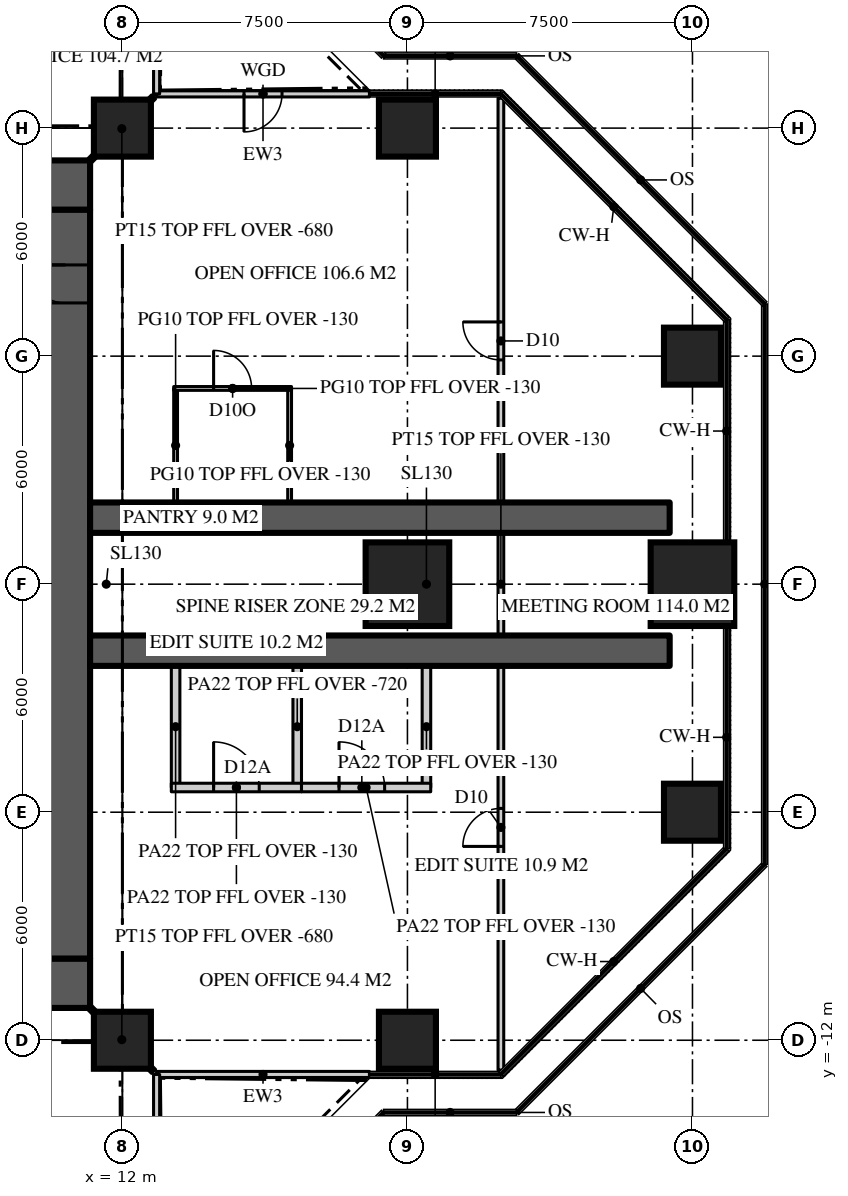
"""IFC4 building model, lengths in metres.
Left out: names, types, materials, properties, quantities, classifications, styles, units other than length and angle.
Written with IfcOpenShell. Run it as: python <this file> out.ifc"""

import sys

from ifc_helpers import new_model, si_unit, direction, frame, frame_2d, origin, origin_2d, place, context, subcontext, project, spatial, rectangle, extrude, element, fill, save


model = new_model("IFC4")
c1 = context("Model", 3, precision=1e-05, world=origin(), true_north=direction((0.0, 1.0)))
c2 = subcontext(c1, "Body", "Model", "MODEL_VIEW")
j1 = project(units=[si_unit("LENGTHUNIT", "METRE"), si_unit("PLANEANGLEUNIT", "RADIAN")], contexts=[c1])
p1 = place(None, origin())
s1 = spatial("IfcSite", under=j1, at=p1, CompositionType="ELEMENT")
p2 = place(p1, origin())
s2 = spatial("IfcBuilding", under=s1, at=p2, CompositionType="ELEMENT")
p3 = place(p2, frame((0.0, 0.0, 232.2)))
s3 = spatial("IfcBuildingStorey", under=s2, at=p3, CompositionType="ELEMENT", Elevation=232.2)
p4 = place(p3, frame((-11.15, 10.5, 0.0), z_axis=(0.0, 0.0, 1.0), x_axis=(1.0, 0.0, 0.0)))
e1 = element("IfcWall", 1, at=p4, inside=s3, PredefinedType="SHEAR", context=c2, shape_type="SweptSolid", body=[
    extrude(rectangle(XDim=22.3, YDim=1.3, at=frame_2d((11.15, 0.0))), origin(), (0.0, 0.0, 1.0), 3.9),
])
p5 = place(p4, frame((4.25, 0.0, 0.0)))
e2 = element("IfcOpeningElement", 2, at=p5, cuts=e1, PredefinedType="OPENING", context=c2, shape_type="SweptSolid", body=[
    extrude(rectangle(XDim=1.8, YDim=2.2, at=frame_2d((0.9, 1.1))), frame((0.0, 0.66, 0.0), z_axis=(0.0, -1.0, 0.0), x_axis=(1.0, 0.0, 0.0)), (0.0, 0.0, 1.0), 1.32),
])
p6 = place(p4, frame((16.25, 0.0, 0.0)))
e3 = element("IfcOpeningElement", 3, at=p6, cuts=e1, PredefinedType="OPENING", context=c2, shape_type="SweptSolid", body=[
    extrude(rectangle(XDim=1.8, YDim=2.2, at=frame_2d((0.9, 1.1))), frame((0.0, 0.66, 0.0), z_axis=(0.0, -1.0, 0.0), x_axis=(1.0, 0.0, 0.0)), (0.0, 0.0, 1.0), 1.32),
])
p7 = place(p3, frame((11.15, -10.5, 0.0), z_axis=(0.0, 0.0, 1.0), x_axis=(-1.0, 0.0, 0.0)))
e4 = element("IfcWall", 4, at=p7, inside=s3, PredefinedType="SHEAR", context=c2, shape_type="SweptSolid", body=[
    extrude(rectangle(XDim=22.3, YDim=1.3, at=frame_2d((11.15, 0.0))), origin(), (0.0, 0.0, 1.0), 3.9),
])
p8 = place(p7, frame((16.25, 0.0, 0.0)))
e5 = element("IfcOpeningElement", 5, at=p8, cuts=e4, PredefinedType="OPENING", context=c2, shape_type="SweptSolid", body=[
    extrude(rectangle(XDim=1.8, YDim=2.2, at=frame_2d((0.9, 1.1))), frame((0.0, 0.66, 0.0), z_axis=(0.0, -1.0, 0.0), x_axis=(1.0, 0.0, 0.0)), (0.0, 0.0, 1.0), 1.32),
])
p9 = place(p7, frame((4.25, 0.0, 0.0)))
e6 = element("IfcOpeningElement", 6, at=p9, cuts=e4, PredefinedType="OPENING", context=c2, shape_type="SweptSolid", body=[
    extrude(rectangle(XDim=1.8, YDim=2.2, at=frame_2d((0.9, 1.1))), frame((0.0, 0.66, 0.0), z_axis=(0.0, -1.0, 0.0), x_axis=(1.0, 0.0, 0.0)), (0.0, 0.0, 1.0), 1.32),
])
p10 = place(p3, frame((10.5, -9.85, 0.0), z_axis=(0.0, 0.0, 1.0), x_axis=(0.0, 1.0, 0.0)))
e7 = element("IfcWall", 7, at=p10, inside=s3, PredefinedType="SHEAR", context=c2, shape_type="SweptSolid", body=[
    extrude(rectangle(XDim=19.7, YDim=1.3, at=frame_2d((9.85, 0.0))), origin(), (0.0, 0.0, 1.0), 3.9),
])
p11 = place(p10, frame((17.25, 0.0, 0.0)))
e8 = element("IfcOpeningElement", 8, at=p11, cuts=e7, PredefinedType="OPENING", context=c2, shape_type="SweptSolid", body=[
    extrude(rectangle(XDim=1.0, YDim=2.2, at=frame_2d((0.5, 1.1))), frame((0.0, 0.66, 0.0), z_axis=(0.0, -1.0, 0.0), x_axis=(1.0, 0.0, 0.0)), (0.0, 0.0, 1.0), 1.32),
])
for number, where, z_axis, x_axis in (
    (9, (11.15, -1.75, 0.0), (0.0, 0.0, 1.0), (1.0, 0.0, 0.0)),
    (10, (11.15, 1.75, 0.0), (0.0, 0.0, 1.0), (1.0, 0.0, 0.0)),
):
    element("IfcWall", number, at=place(p3, frame(where, z_axis=z_axis, x_axis=x_axis)), inside=s3, PredefinedType="SHEAR", context=c2, shape_type="SweptSolid", body=[
        extrude(rectangle(XDim=15.25, YDim=0.8, at=frame_2d((7.625, 0.0))), origin(), (0.0, 0.0, 1.0), 3.9),
    ])
for number, where, z_axis, x_axis in (
    (11, (12.0, -12.0, 0.0), (0.0, 0.0, 1.0), (1.0, 0.0, 0.0)),
    (12, (19.5, -12.0, 0.0), (0.0, 0.0, 1.0), (1.0, 0.0, 0.0)),
    (13, (27.0, -6.0, 0.0), (0.0, 0.0, 1.0), (1.0, 0.0, 0.0)),
):
    element("IfcColumn", number, at=place(p3, frame(where, z_axis=z_axis, x_axis=x_axis)), inside=s3, PredefinedType="COLUMN", context=c2, shape_type="SweptSolid", body=[
        extrude(rectangle(XDim=1.5, YDim=1.5, at=origin_2d()), origin(), (0.0, 0.0, 1.0), 3.9),
    ])
for number, where, z_axis, x_axis in (
    (14, (19.5, 0.0, 0.0), (0.0, 0.0, 1.0), (1.0, 0.0, 0.0)),
    (15, (27.0, 0.0, 0.0), (0.0, 0.0, 1.0), (1.0, 0.0, 0.0)),
):
    element("IfcColumn", number, at=place(p3, frame(where, z_axis=z_axis, x_axis=x_axis)), inside=s3, PredefinedType="COLUMN", context=c2, shape_type="SweptSolid", body=[
        extrude(rectangle(XDim=2.2, YDim=2.2, at=origin_2d()), origin(), (0.0, 0.0, 1.0), 3.9),
    ])
for number, where, z_axis, x_axis in (
    (16, (27.0, 6.0, 0.0), (0.0, 0.0, 1.0), (1.0, 0.0, 0.0)),
    (17, (12.0, 12.0, 0.0), (0.0, 0.0, 1.0), (1.0, 0.0, 0.0)),
    (18, (19.5, 12.0, 0.0), (0.0, 0.0, 1.0), (1.0, 0.0, 0.0)),
):
    element("IfcColumn", number, at=place(p3, frame(where, z_axis=z_axis, x_axis=x_axis)), inside=s3, PredefinedType="COLUMN", context=c2, shape_type="SweptSolid", body=[
        extrude(rectangle(XDim=1.5, YDim=1.5, at=origin_2d()), origin(), (0.0, 0.0, 1.0), 3.9),
    ])
p12 = place(p3, frame((12.9, -12.9, 0.0), z_axis=(0.0, 0.0, 1.0), x_axis=(1.0, 0.0, 0.0)))
e19 = element("IfcWall", 19, at=p12, inside=s3, PredefinedType="SOLIDWALL", context=c2, shape_type="SweptSolid", body=[
    extrude(rectangle(XDim=5.6, YDim=0.16, at=frame_2d((2.8, 0.0))), origin(), (0.0, 0.0, 1.0), 3.77),
])
p13 = place(p3, frame((18.5, 12.9, 0.0), z_axis=(0.0, 0.0, 1.0), x_axis=(-1.0, 0.0, 0.0)))
e20 = element("IfcWall", 20, at=p13, inside=s3, PredefinedType="SOLIDWALL", context=c2, shape_type="SweptSolid", body=[
    extrude(rectangle(XDim=5.6, YDim=0.16, at=frame_2d((2.8, 0.0))), origin(), (0.0, 0.0, 1.0), 3.77),
])
p14 = place(p13, frame((2.3, 0.0, 0.0)))
e21 = element("IfcOpeningElement", 21, at=p14, cuts=e20, PredefinedType="OPENING", context=c2, shape_type="SweptSolid", body=[
    extrude(rectangle(XDim=1.0, YDim=2.2, at=frame_2d((0.5, 1.1))), frame((0.0, 0.09, 0.0), z_axis=(0.0, -1.0, 0.0), x_axis=(1.0, 0.0, 0.0)), (0.0, 0.0, 1.0), 0.18),
])
p15 = place(p3, frame((12.9, 12.9, 0.0), z_axis=(0.0, 0.0, 1.0), x_axis=(0.0, 1.0, 0.0)))
e22 = element("IfcWall", 22, at=p15, inside=s3, PredefinedType="SOLIDWALL", context=c2, shape_type="SweptSolid", body=[
    extrude(rectangle(XDim=5.6, YDim=0.16, at=frame_2d((2.8, 0.0))), origin(), (0.0, 0.0, 1.0), 3.77),
])
p16 = place(p3, frame((12.9, -18.5, 0.0), z_axis=(0.0, 0.0, 1.0), x_axis=(0.0, 1.0, 0.0)))
e23 = element("IfcWall", 23, at=p16, inside=s3, PredefinedType="SOLIDWALL", context=c2, shape_type="SweptSolid", body=[
    extrude(rectangle(XDim=5.6, YDim=0.16, at=frame_2d((2.8, 0.0))), origin(), (0.0, 0.0, 1.0), 3.77),
])
p17 = place(p16, frame((2.3, 0.0, 0.0)))
e24 = element("IfcOpeningElement", 24, at=p17, cuts=e23, PredefinedType="OPENING", context=c2, shape_type="SweptSolid", body=[
    extrude(rectangle(XDim=1.0, YDim=2.2, at=frame_2d((0.5, 1.1))), frame((0.0, 0.09, 0.0), z_axis=(0.0, -1.0, 0.0), x_axis=(1.0, 0.0, 0.0)), (0.0, 0.0, 1.0), 0.18),
])
p18 = place(p3, frame((21.959, -12.786, 0.0), z_axis=(0.0, 0.0, 1.0), x_axis=(0.0, 1.0, 0.0)))
e25 = element("IfcWall", 25, at=p18, inside=s3, PredefinedType="PARTITIONING", context=c2, shape_type="SweptSolid", body=[
    extrude(rectangle(XDim=25.573, YDim=0.15, at=frame_2d((12.786, 0.0))), origin(), (0.0, 0.0, 1.0), 3.77),
])
p19 = place(p18, frame((18.687, 0.0, 0.0)))
e26 = element("IfcOpeningElement", 26, at=p19, cuts=e25, PredefinedType="OPENING", context=c2, shape_type="SweptSolid", body=[
    extrude(rectangle(XDim=1.0, YDim=2.2, at=frame_2d((0.5, 1.1))), frame((0.0, 0.085, 0.0), z_axis=(0.0, -1.0, 0.0), x_axis=(1.0, 0.0, 0.0)), (0.0, 0.0, 1.0), 0.17),
])
p20 = place(p18, frame((5.886, 0.0, 0.0)))
e27 = element("IfcOpeningElement", 27, at=p20, cuts=e25, PredefinedType="OPENING", context=c2, shape_type="SweptSolid", body=[
    extrude(rectangle(XDim=1.0, YDim=2.2, at=frame_2d((0.5, 1.1))), frame((0.0, 0.085, 0.0), z_axis=(0.0, -1.0, 0.0), x_axis=(1.0, 0.0, 0.0)), (0.0, 0.0, 1.0), 0.17),
])
for number, where, z_axis, x_axis in (
    (28, (13.4, 2.15, 0.0), (0.0, 0.0, 1.0), (0.0, 1.0, 0.0)),
    (29, (16.4, 2.15, 0.0), (0.0, 0.0, 1.0), (0.0, 1.0, 0.0)),
):
    element("IfcWall", number, at=place(p3, frame(where, z_axis=z_axis, x_axis=x_axis)), inside=s3, PredefinedType="PARTITIONING", context=c2, shape_type="SweptSolid", body=[
        extrude(rectangle(XDim=3.0, YDim=0.1, at=frame_2d((1.5, 0.0))), origin(), (0.0, 0.0, 1.0), 3.77),
    ])
p21 = place(p3, frame((13.35, 5.15, 0.0), z_axis=(0.0, 0.0, 1.0), x_axis=(1.0, 0.0, 0.0)))
e30 = element("IfcWall", 30, at=p21, inside=s3, PredefinedType="PARTITIONING", context=c2, shape_type="SweptSolid", body=[
    extrude(rectangle(XDim=3.1, YDim=0.1, at=frame_2d((1.55, 0.0))), origin(), (0.0, 0.0, 1.0), 3.77),
])
p22 = place(p21, frame((1.05, 0.0, 0.0)))
e31 = element("IfcOpeningElement", 31, at=p22, cuts=e30, PredefinedType="OPENING", context=c2, shape_type="SweptSolid", body=[
    extrude(rectangle(XDim=1.0, YDim=2.2, at=frame_2d((0.5, 1.1))), frame((0.0, 0.06, 0.0), z_axis=(0.0, -1.0, 0.0), x_axis=(1.0, 0.0, 0.0)), (0.0, 0.0, 1.0), 0.12),
])
p23 = place(p3, frame((13.4, -2.15, 0.0), z_axis=(0.0, 0.0, 1.0), x_axis=(0.0, -1.0, 0.0)))
e32 = element("IfcWall", 32, at=p23, inside=s3, PredefinedType="PARTITIONING", context=c2, shape_type="SweptSolid", body=[
    extrude(rectangle(XDim=3.2, YDim=0.225, at=frame_2d((1.6, 0.0))), origin(), (0.0, 0.0, 1.0), 3.77),
])
p24 = place(p3, frame((16.6, -2.15, 0.0), z_axis=(0.0, 0.0, 1.0), x_axis=(0.0, -1.0, 0.0)))
e33 = element("IfcWall", 33, at=p24, inside=s3, PredefinedType="PARTITIONING", context=c2, shape_type="SweptSolid", body=[
    extrude(rectangle(XDim=3.2, YDim=0.225, at=frame_2d((1.6, 0.0))), origin(), (0.0, 0.0, 1.0), 3.18),
])
p25 = place(p3, frame((13.288, -5.35, 0.0), z_axis=(0.0, 0.0, 1.0), x_axis=(1.0, 0.0, 0.0)))
e34 = element("IfcWall", 34, at=p25, inside=s3, PredefinedType="PARTITIONING", context=c2, shape_type="SweptSolid", body=[
    extrude(rectangle(XDim=3.425, YDim=0.225, at=frame_2d((1.712, 0.0))), origin(), (0.0, 0.0, 1.0), 3.77),
])
p26 = place(p25, frame((1.113, 0.0, 0.0)))
e35 = element("IfcOpeningElement", 35, at=p26, cuts=e34, PredefinedType="OPENING", context=c2, shape_type="SweptSolid", body=[
    extrude(rectangle(XDim=1.2, YDim=2.2, at=frame_2d((0.6, 1.1))), frame((0.0, 0.123, 0.0), z_axis=(0.0, -1.0, 0.0), x_axis=(1.0, 0.0, 0.0)), (0.0, 0.0, 1.0), 0.245),
])
p27 = place(p3, frame((20.0, -2.15, 0.0), z_axis=(0.0, 0.0, 1.0), x_axis=(0.0, -1.0, 0.0)))
e36 = element("IfcWall", 36, at=p27, inside=s3, PredefinedType="PARTITIONING", context=c2, shape_type="SweptSolid", body=[
    extrude(rectangle(XDim=3.2, YDim=0.225, at=frame_2d((1.6, 0.0))), origin(), (0.0, 0.0, 1.0), 3.77),
])
p28 = place(p3, frame((16.712, -5.35, 0.0), z_axis=(0.0, 0.0, 1.0), x_axis=(1.0, 0.0, 0.0)))
e37 = element("IfcWall", 37, at=p28, inside=s3, PredefinedType="PARTITIONING", context=c2, shape_type="SweptSolid", body=[
    extrude(rectangle(XDim=3.4, YDim=0.225, at=frame_2d((1.7, 0.0))), origin(), (0.0, 0.0, 1.0), 3.77),
])
p29 = place(p28, frame((0.988, 0.0, 0.0)))
e38 = element("IfcOpeningElement", 38, at=p29, cuts=e37, PredefinedType="OPENING", context=c2, shape_type="SweptSolid", body=[
    extrude(rectangle(XDim=1.2, YDim=2.2, at=frame_2d((0.6, 1.1))), frame((0.0, 0.123, 0.0), z_axis=(0.0, -1.0, 0.0), x_axis=(1.0, 0.0, 0.0)), (0.0, 0.0, 1.0), 0.245),
])
for number, where, z_axis, x_axis in (
    (39, (11.15, 11.15, 0.0), (0.0, 0.0, 1.0), (0.707, 0.707, 0.0)),
    (40, (11.15, -11.15, 0.0), (0.0, 0.0, 1.0), (0.707, -0.707, 0.0)),
):
    element("IfcWall", number, at=place(p3, frame(where, z_axis=z_axis, x_axis=x_axis)), inside=s3, PredefinedType="PARTITIONING", context=c2, shape_type="SweptSolid", body=[
        extrude(rectangle(XDim=2.362, YDim=0.15, at=frame_2d((1.181, 0.0))), origin(), (0.0, 0.0, 1.0), 3.22),
    ])
p30 = place(p14, origin())
e41 = element("IfcDoor", 41, at=p30, inside=s3, OperationType="SINGLE_SWING_RIGHT", PredefinedType="DOOR", context=c2, shape_type="SweptSolid", body=[
    extrude(rectangle(XDim=1.0, YDim=2.2, at=frame_2d((0.5, 1.1))), frame((0.0, 0.025, 0.0), z_axis=(0.0, -1.0, 0.0), x_axis=(1.0, 0.0, 0.0)), (0.0, 0.0, 1.0), 0.05),
])
fill(e21, e41)
p31 = place(p11, origin())
e42 = element("IfcDoor", 42, at=p31, inside=s3, OperationType="SINGLE_SWING_RIGHT", PredefinedType="DOOR", context=c2, shape_type="SweptSolid", body=[
    extrude(rectangle(XDim=1.0, YDim=2.2, at=frame_2d((0.5, 1.1))), frame((0.0, 0.025, 0.0), z_axis=(0.0, -1.0, 0.0), x_axis=(1.0, 0.0, 0.0)), (0.0, 0.0, 1.0), 0.05),
])
fill(e8, e42)
p32 = place(p19, origin())
e43 = element("IfcDoor", 43, at=p32, inside=s3, OperationType="SINGLE_SWING_RIGHT", PredefinedType="DOOR", context=c2, shape_type="SweptSolid", body=[
    extrude(rectangle(XDim=1.0, YDim=2.2, at=frame_2d((0.5, 1.1))), frame((0.0, 0.025, 0.0), z_axis=(0.0, -1.0, 0.0), x_axis=(1.0, 0.0, 0.0)), (0.0, 0.0, 1.0), 0.05),
])
fill(e26, e43)
p33 = place(p20, origin())
e44 = element("IfcDoor", 44, at=p33, inside=s3, OperationType="SINGLE_SWING_LEFT", PredefinedType="DOOR", context=c2, shape_type="SweptSolid", body=[
    extrude(rectangle(XDim=1.0, YDim=2.2, at=frame_2d((0.5, 1.1))), frame((0.0, 0.025, 0.0), z_axis=(0.0, -1.0, 0.0), x_axis=(1.0, 0.0, 0.0)), (0.0, 0.0, 1.0), 0.05),
])
fill(e27, e44)
p34 = place(p22, origin())
e45 = element("IfcDoor", 45, at=p34, inside=s3, OperationType="SINGLE_SWING_LEFT", PredefinedType="DOOR", context=c2, shape_type="SweptSolid", body=[
    extrude(rectangle(XDim=1.0, YDim=2.2, at=frame_2d((0.5, 1.1))), frame((0.0, 0.025, 0.0), z_axis=(0.0, -1.0, 0.0), x_axis=(1.0, 0.0, 0.0)), (0.0, 0.0, 1.0), 0.05),
])
fill(e31, e45)
p35 = place(p26, origin())
e46 = element("IfcDoor", 46, at=p35, inside=s3, OperationType="SINGLE_SWING_LEFT", PredefinedType="DOOR", context=c2, shape_type="SweptSolid", body=[
    extrude(rectangle(XDim=1.2, YDim=2.2, at=frame_2d((0.6, 1.1))), frame((0.0, 0.025, 0.0), z_axis=(0.0, -1.0, 0.0), x_axis=(1.0, 0.0, 0.0)), (0.0, 0.0, 1.0), 0.05),
])
fill(e35, e46)
p36 = place(p29, origin())
e47 = element("IfcDoor", 47, at=p36, inside=s3, OperationType="SINGLE_SWING_LEFT", PredefinedType="DOOR", context=c2, shape_type="SweptSolid", body=[
    extrude(rectangle(XDim=1.2, YDim=2.2, at=frame_2d((0.6, 1.1))), frame((0.0, 0.025, 0.0), z_axis=(0.0, -1.0, 0.0), x_axis=(1.0, 0.0, 0.0)), (0.0, 0.0, 1.0), 0.05),
])
fill(e38, e47)
save(model, sys.argv[1])
